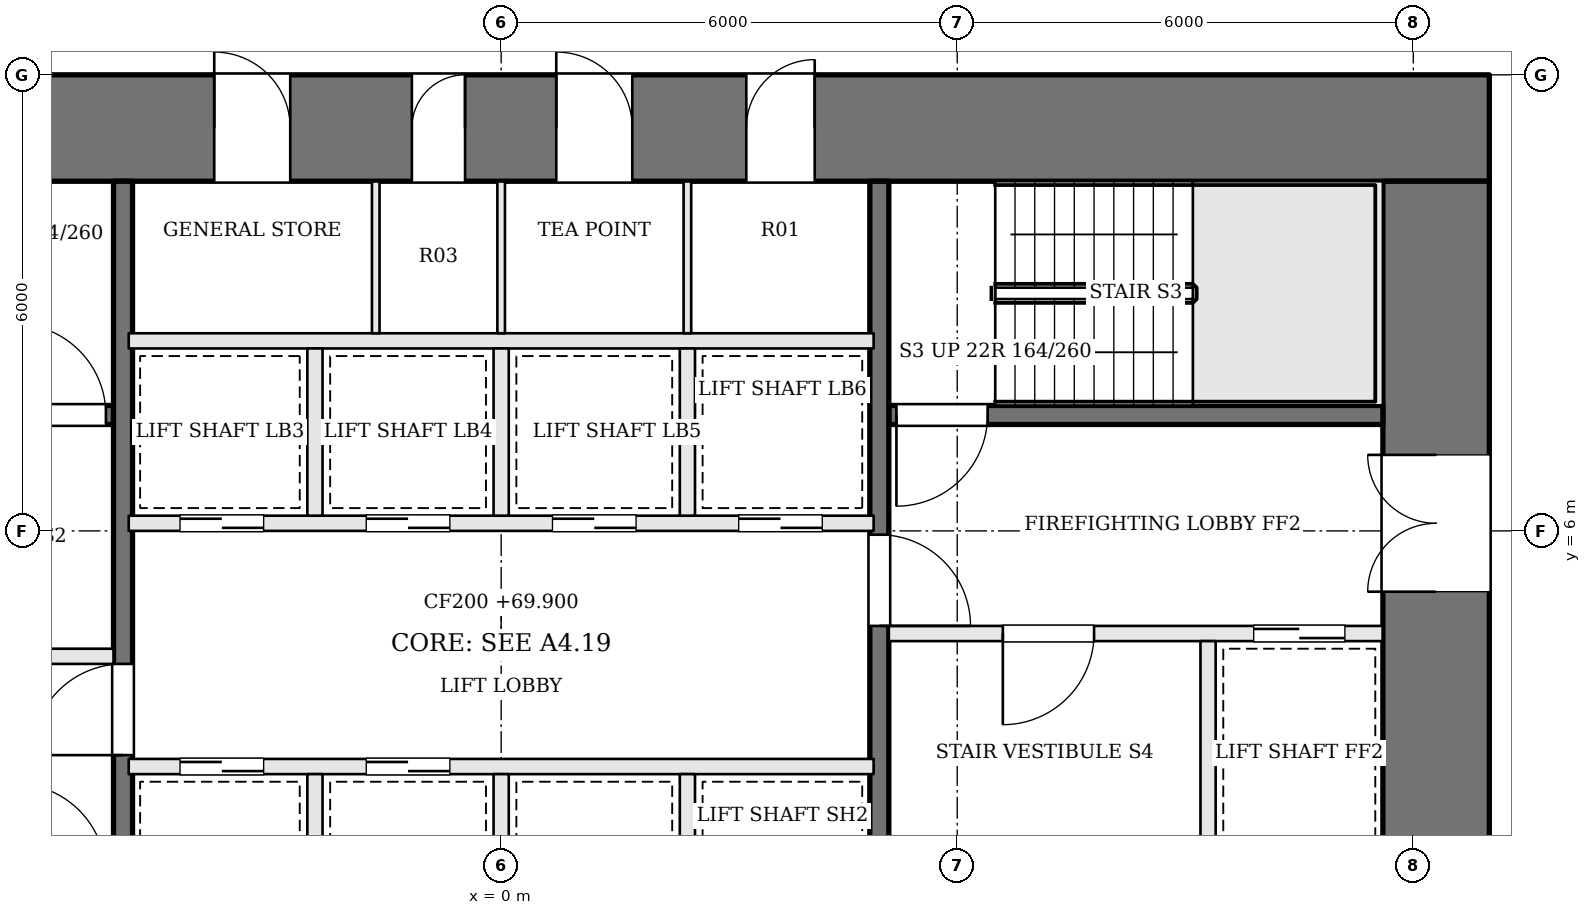
"""IFC4 building model, lengths in metres.
Left out: names, types, materials, properties, quantities, classifications, styles, units other than length and angle.
Written with IfcOpenShell. Run it as: python <this file> out.ifc"""

import sys

from ifc_helpers import new_model, si_unit, direction, frame, frame_2d, origin, place, context, subcontext, project, spatial, rectangle, extrude, element, fill, save


model = new_model("IFC4")
c1 = context("Model", 3, precision=1e-05, world=origin(), true_north=direction((0.0, 1.0)))
c2 = subcontext(c1, "Body", "Model", "MODEL_VIEW")
j1 = project(units=[si_unit("LENGTHUNIT", "METRE"), si_unit("PLANEANGLEUNIT", "RADIAN")], contexts=[c1])
p1 = place(None, origin())
s1 = spatial("IfcSite", under=j1, at=p1, CompositionType="ELEMENT")
p2 = place(p1, origin())
s2 = spatial("IfcBuilding", under=s1, at=p2, CompositionType="ELEMENT")
p3 = place(p2, frame((0.0, 0.0, 69.9)))
s3 = spatial("IfcBuildingStorey", under=s2, at=p3, CompositionType="ELEMENT", Elevation=69.9)
p4 = place(p3, frame((-13.0, 11.3, 0.0), z_axis=(0.0, 0.0, 1.0), x_axis=(1.0, 0.0, 0.0)))
e1 = element("IfcWall", 1, at=p4, inside=s3, PredefinedType="SHEAR", context=c2, shape_type="SweptSolid", body=[
    extrude(rectangle(XDim=26.0, YDim=1.4, at=frame_2d((13.0, 0.0))), origin(), (0.0, 0.0, 1.0), 3.6),
])
p5 = place(p4, frame((9.225, 0.0, 0.0)))
e2 = element("IfcOpeningElement", 2, at=p5, cuts=e1, PredefinedType="OPENING", context=c2, shape_type="SweptSolid", body=[
    extrude(rectangle(XDim=1.0, YDim=2.1, at=frame_2d((0.5, 1.05))), frame((0.0, 0.71, 0.0), z_axis=(0.0, -1.0, 0.0), x_axis=(1.0, 0.0, 0.0)), (0.0, 0.0, 1.0), 1.42),
])
p6 = place(p4, frame((11.825, 0.0, 0.0)))
e3 = element("IfcOpeningElement", 3, at=p6, cuts=e1, PredefinedType="OPENING", context=c2, shape_type="SweptSolid", body=[
    extrude(rectangle(XDim=0.7, YDim=2.1, at=frame_2d((0.35, 1.05))), frame((0.0, 0.71, 0.0), z_axis=(0.0, -1.0, 0.0), x_axis=(1.0, 0.0, 0.0)), (0.0, 0.0, 1.0), 1.42),
])
p7 = place(p4, frame((13.725, 0.0, 0.0)))
e4 = element("IfcOpeningElement", 4, at=p7, cuts=e1, PredefinedType="OPENING", context=c2, shape_type="SweptSolid", body=[
    extrude(rectangle(XDim=1.0, YDim=2.1, at=frame_2d((0.5, 1.05))), frame((0.0, 0.71, 0.0), z_axis=(0.0, -1.0, 0.0), x_axis=(1.0, 0.0, 0.0)), (0.0, 0.0, 1.0), 1.42),
])
p8 = place(p4, frame((16.225, 0.0, 0.0)))
e5 = element("IfcOpeningElement", 5, at=p8, cuts=e1, PredefinedType="OPENING", context=c2, shape_type="SweptSolid", body=[
    extrude(rectangle(XDim=0.9, YDim=2.1, at=frame_2d((0.45, 1.05))), frame((0.0, 0.71, 0.0), z_axis=(0.0, -1.0, 0.0), x_axis=(1.0, 0.0, 0.0)), (0.0, 0.0, 1.0), 1.42),
])
p9 = place(p3, frame((12.3, -1.6, 0.0), z_axis=(0.0, 0.0, 1.0), x_axis=(0.0, 1.0, 0.0)))
e6 = element("IfcWall", 6, at=p9, inside=s3, PredefinedType="SHEAR", context=c2, shape_type="SweptSolid", body=[
    extrude(rectangle(XDim=12.2, YDim=1.4, at=frame_2d((6.1, 0.0))), origin(), (0.0, 0.0, 1.0), 3.6),
])
p10 = place(p9, frame((6.8, 0.0, 0.0)))
e7 = element("IfcOpeningElement", 7, at=p10, cuts=e6, PredefinedType="OPENING", context=c2, shape_type="SweptSolid", body=[
    extrude(rectangle(XDim=1.8, YDim=2.1, at=frame_2d((0.9, 1.05))), frame((0.0, 0.71, 0.0), z_axis=(0.0, -1.0, 0.0), x_axis=(1.0, 0.0, 0.0)), (0.0, 0.0, 1.0), 1.42),
])
p11 = place(p3, frame((11.6, 7.525, 0.0), z_axis=(0.0, 0.0, 1.0), x_axis=(-1.0, 0.0, 0.0)))
e8 = element("IfcWall", 8, at=p11, inside=s3, PredefinedType="SOLIDWALL", context=c2, shape_type="SweptSolid", body=[
    extrude(rectangle(XDim=6.5, YDim=0.25, at=frame_2d((3.25, 0.0))), origin(), (0.0, 0.0, 1.0), 3.4),
])
p12 = place(p11, frame((5.2, 0.0, 0.0)))
e9 = element("IfcOpeningElement", 9, at=p12, cuts=e8, PredefinedType="OPENING", context=c2, shape_type="SweptSolid", body=[
    extrude(rectangle(XDim=1.2, YDim=2.1, at=frame_2d((0.6, 1.05))), frame((0.0, 0.135, 0.0), z_axis=(0.0, -1.0, 0.0), x_axis=(1.0, 0.0, 0.0)), (0.0, 0.0, 1.0), 0.27),
])
p13 = place(p3, frame((-11.6, 4.35, 0.0), z_axis=(0.0, 0.0, 1.0), x_axis=(1.0, 0.0, 0.0)))
e10 = element("IfcWall", 10, at=p13, inside=s3, PredefinedType="SOLIDWALL", context=c2, shape_type="SweptSolid", body=[
    extrude(rectangle(XDim=6.5, YDim=0.2, at=frame_2d((3.25, 0.0))), origin(), (0.0, 0.0, 1.0), 3.4),
])
p14 = place(p13, frame((3.8, 0.0, 0.0)))
e11 = element("IfcOpeningElement", 11, at=p14, cuts=e10, PredefinedType="OPENING", context=c2, shape_type="SweptSolid", body=[
    extrude(rectangle(XDim=1.2, YDim=2.1, at=frame_2d((0.6, 1.05))), frame((0.0, 0.11, 0.0), z_axis=(0.0, -1.0, 0.0), x_axis=(1.0, 0.0, 0.0)), (0.0, 0.0, 1.0), 0.22),
])
p15 = place(p13, frame((0.5, 0.0, 0.0)))
e12 = element("IfcOpeningElement", 12, at=p15, cuts=e10, PredefinedType="OPENING", context=c2, shape_type="SweptSolid", body=[
    extrude(rectangle(XDim=1.2, YDim=2.1, at=frame_2d((0.6, 1.05))), frame((0.0, 0.11, 0.0), z_axis=(0.0, -1.0, 0.0), x_axis=(1.0, 0.0, 0.0)), (0.0, 0.0, 1.0), 0.22),
])
p16 = place(p3, frame((11.6, 4.65, 0.0), z_axis=(0.0, 0.0, 1.0), x_axis=(-1.0, 0.0, 0.0)))
e13 = element("IfcWall", 13, at=p16, inside=s3, PredefinedType="SOLIDWALL", context=c2, shape_type="SweptSolid", body=[
    extrude(rectangle(XDim=6.5, YDim=0.2, at=frame_2d((3.25, 0.0))), origin(), (0.0, 0.0, 1.0), 3.4),
])
p17 = place(p16, frame((3.8, 0.0, 0.0)))
e14 = element("IfcOpeningElement", 14, at=p17, cuts=e13, PredefinedType="OPENING", context=c2, shape_type="SweptSolid", body=[
    extrude(rectangle(XDim=1.2, YDim=2.1, at=frame_2d((0.6, 1.05))), frame((0.0, 0.11, 0.0), z_axis=(0.0, -1.0, 0.0), x_axis=(1.0, 0.0, 0.0)), (0.0, 0.0, 1.0), 0.22),
])
p18 = place(p16, frame((0.5, 0.0, 0.0)))
e15 = element("IfcOpeningElement", 15, at=p18, cuts=e13, PredefinedType="OPENING", context=c2, shape_type="SweptSolid", body=[
    extrude(rectangle(XDim=1.2, YDim=2.1, at=frame_2d((0.6, 1.05))), frame((0.0, 0.11, 0.0), z_axis=(0.0, -1.0, 0.0), x_axis=(1.0, 0.0, 0.0)), (0.0, 0.0, 1.0), 0.22),
])
p19 = place(p3, frame((-11.6, 7.525, 0.0), z_axis=(0.0, 0.0, 1.0), x_axis=(1.0, 0.0, 0.0)))
e16 = element("IfcWall", 16, at=p19, inside=s3, PredefinedType="SOLIDWALL", context=c2, shape_type="SweptSolid", body=[
    extrude(rectangle(XDim=6.5, YDim=0.25, at=frame_2d((3.25, 0.0))), origin(), (0.0, 0.0, 1.0), 3.4),
])
p20 = place(p19, frame((5.2, 0.0, 0.0)))
e17 = element("IfcOpeningElement", 17, at=p20, cuts=e16, PredefinedType="OPENING", context=c2, shape_type="SweptSolid", body=[
    extrude(rectangle(XDim=1.2, YDim=2.1, at=frame_2d((0.6, 1.05))), frame((0.0, 0.135, 0.0), z_axis=(0.0, -1.0, 0.0), x_axis=(1.0, 0.0, 0.0)), (0.0, 0.0, 1.0), 0.27),
])
p21 = place(p3, frame((9.3, 4.55, 0.0), z_axis=(0.0, 0.0, 1.0), x_axis=(0.0, -1.0, 0.0)))
e18 = element("IfcWall", 18, at=p21, inside=s3, PredefinedType="SOLIDWALL", context=c2, shape_type="SweptSolid", body=[
    extrude(rectangle(XDim=3.0, YDim=0.2, at=frame_2d((1.5, 0.0))), origin(), (0.0, 0.0, 1.0), 3.4),
])
p22 = place(p3, frame((-4.975, -1.6, 0.0), z_axis=(0.0, 0.0, 1.0), x_axis=(0.0, 1.0, 0.0)))
e19 = element("IfcWall", 19, at=p22, inside=s3, PredefinedType="SOLIDWALL", context=c2, shape_type="SweptSolid", body=[
    extrude(rectangle(XDim=12.2, YDim=0.25, at=frame_2d((6.1, 0.0))), origin(), (0.0, 0.0, 1.0), 3.4),
])
p23 = place(p22, frame((4.65, 0.0, 0.0)))
e20 = element("IfcOpeningElement", 20, at=p23, cuts=e19, PredefinedType="OPENING", context=c2, shape_type="SweptSolid", body=[
    extrude(rectangle(XDim=1.2, YDim=2.1, at=frame_2d((0.6, 1.05))), frame((0.0, 0.135, 0.0), z_axis=(0.0, -1.0, 0.0), x_axis=(1.0, 0.0, 0.0)), (0.0, 0.0, 1.0), 0.27),
])
p24 = place(p3, frame((4.975, 10.6, 0.0), z_axis=(0.0, 0.0, 1.0), x_axis=(0.0, -1.0, 0.0)))
e21 = element("IfcWall", 21, at=p24, inside=s3, PredefinedType="SOLIDWALL", context=c2, shape_type="SweptSolid", body=[
    extrude(rectangle(XDim=12.2, YDim=0.25, at=frame_2d((6.1, 0.0))), origin(), (0.0, 0.0, 1.0), 3.4),
])
p25 = place(p24, frame((4.65, 0.0, 0.0)))
e22 = element("IfcOpeningElement", 22, at=p25, cuts=e21, PredefinedType="OPENING", context=c2, shape_type="SweptSolid", body=[
    extrude(rectangle(XDim=1.2, YDim=2.1, at=frame_2d((0.6, 1.05))), frame((0.0, 0.135, 0.0), z_axis=(0.0, -1.0, 0.0), x_axis=(1.0, 0.0, 0.0)), (0.0, 0.0, 1.0), 0.27),
])
p26 = place(p3, frame((-4.9, 2.9, 0.0), z_axis=(0.0, 0.0, 1.0), x_axis=(1.0, 0.0, 0.0)))
e23 = element("IfcWall", 23, at=p26, inside=s3, PredefinedType="SOLIDWALL", context=c2, shape_type="SweptSolid", body=[
    extrude(rectangle(XDim=9.8, YDim=0.2, at=frame_2d((4.9, 0.0))), origin(), (0.0, 0.0, 1.0), 3.4),
])
p27 = place(p26, frame((0.675, 0.0, 0.0)))
e24 = element("IfcOpeningElement", 24, at=p27, cuts=e23, PredefinedType="OPENING", context=c2, shape_type="SweptSolid", body=[
    extrude(rectangle(XDim=1.1, YDim=2.1, at=frame_2d((0.55, 1.05))), frame((0.0, 0.11, 0.0), z_axis=(0.0, -1.0, 0.0), x_axis=(1.0, 0.0, 0.0)), (0.0, 0.0, 1.0), 0.22),
])
p28 = place(p26, frame((3.125, 0.0, 0.0)))
e25 = element("IfcOpeningElement", 25, at=p28, cuts=e23, PredefinedType="OPENING", context=c2, shape_type="SweptSolid", body=[
    extrude(rectangle(XDim=1.1, YDim=2.1, at=frame_2d((0.55, 1.05))), frame((0.0, 0.11, 0.0), z_axis=(0.0, -1.0, 0.0), x_axis=(1.0, 0.0, 0.0)), (0.0, 0.0, 1.0), 0.22),
])
p29 = place(p3, frame((-4.9, 6.1, 0.0), z_axis=(0.0, 0.0, 1.0), x_axis=(1.0, 0.0, 0.0)))
e26 = element("IfcWall", 26, at=p29, inside=s3, PredefinedType="SOLIDWALL", context=c2, shape_type="SweptSolid", body=[
    extrude(rectangle(XDim=9.8, YDim=0.2, at=frame_2d((4.9, 0.0))), origin(), (0.0, 0.0, 1.0), 3.4),
])
p30 = place(p29, frame((0.675, 0.0, 0.0)))
e27 = element("IfcOpeningElement", 27, at=p30, cuts=e26, PredefinedType="OPENING", context=c2, shape_type="SweptSolid", body=[
    extrude(rectangle(XDim=1.1, YDim=2.1, at=frame_2d((0.55, 1.05))), frame((0.0, 0.11, 0.0), z_axis=(0.0, -1.0, 0.0), x_axis=(1.0, 0.0, 0.0)), (0.0, 0.0, 1.0), 0.22),
])
p31 = place(p29, frame((3.125, 0.0, 0.0)))
e28 = element("IfcOpeningElement", 28, at=p31, cuts=e26, PredefinedType="OPENING", context=c2, shape_type="SweptSolid", body=[
    extrude(rectangle(XDim=1.1, YDim=2.1, at=frame_2d((0.55, 1.05))), frame((0.0, 0.11, 0.0), z_axis=(0.0, -1.0, 0.0), x_axis=(1.0, 0.0, 0.0)), (0.0, 0.0, 1.0), 0.22),
])
p32 = place(p29, frame((5.575, 0.0, 0.0)))
e29 = element("IfcOpeningElement", 29, at=p32, cuts=e26, PredefinedType="OPENING", context=c2, shape_type="SweptSolid", body=[
    extrude(rectangle(XDim=1.1, YDim=2.1, at=frame_2d((0.55, 1.05))), frame((0.0, 0.11, 0.0), z_axis=(0.0, -1.0, 0.0), x_axis=(1.0, 0.0, 0.0)), (0.0, 0.0, 1.0), 0.22),
])
p33 = place(p29, frame((8.025, 0.0, 0.0)))
e30 = element("IfcOpeningElement", 30, at=p33, cuts=e26, PredefinedType="OPENING", context=c2, shape_type="SweptSolid", body=[
    extrude(rectangle(XDim=1.1, YDim=2.1, at=frame_2d((0.55, 1.05))), frame((0.0, 0.11, 0.0), z_axis=(0.0, -1.0, 0.0), x_axis=(1.0, 0.0, 0.0)), (0.0, 0.0, 1.0), 0.22),
])
p34 = place(p3, frame((-4.9, 8.5, 0.0), z_axis=(0.0, 0.0, 1.0), x_axis=(1.0, 0.0, 0.0)))
e31 = element("IfcWall", 31, at=p34, inside=s3, PredefinedType="SOLIDWALL", context=c2, shape_type="SweptSolid", body=[
    extrude(rectangle(XDim=9.8, YDim=0.2, at=frame_2d((4.9, 0.0))), origin(), (0.0, 0.0, 1.0), 3.4),
])
for number, where, z_axis, x_axis in (
    (32, (-2.45, 0.6, 0.0), (0.0, 0.0, 1.0), (0.0, 1.0, 0.0)),
    (33, (0.0, 0.6, 0.0), (0.0, 0.0, 1.0), (0.0, 1.0, 0.0)),
    (34, (2.45, 0.6, 0.0), (0.0, 0.0, 1.0), (0.0, 1.0, 0.0)),
    (35, (-2.45, 6.2, 0.0), (0.0, 0.0, 1.0), (0.0, 1.0, 0.0)),
    (36, (0.0, 6.2, 0.0), (0.0, 0.0, 1.0), (0.0, 1.0, 0.0)),
    (37, (2.45, 6.2, 0.0), (0.0, 0.0, 1.0), (0.0, 1.0, 0.0)),
):
    element("IfcWall", number, at=place(p3, frame(where, z_axis=z_axis, x_axis=x_axis)), inside=s3, PredefinedType="SOLIDWALL", context=c2, shape_type="SweptSolid", body=[
        extrude(rectangle(XDim=2.2, YDim=0.2, at=frame_2d((1.1, 0.0))), origin(), (0.0, 0.0, 1.0), 3.4),
    ])
for number, where, z_axis, x_axis in (
    (38, (-1.65, 8.6, 0.0), (0.0, 0.0, 1.0), (0.0, 1.0, 0.0)),
    (39, (0.0, 8.6, 0.0), (0.0, 0.0, 1.0), (0.0, 1.0, 0.0)),
    (40, (2.45, 8.6, 0.0), (0.0, 0.0, 1.0), (0.0, 1.0, 0.0)),
):
    element("IfcWall", number, at=place(p3, frame(where, z_axis=z_axis, x_axis=x_axis)), inside=s3, PredefinedType="PARTITIONING", context=c2, shape_type="SweptSolid", body=[
        extrude(rectangle(XDim=2.0, YDim=0.1, at=frame_2d((1.0, 0.0))), origin(), (0.0, 0.0, 1.0), 3.4),
    ])
p35 = place(p10, origin())
e41 = element("IfcDoor", 41, at=p35, inside=s3, OperationType="DOUBLE_DOOR_SINGLE_SWING", PredefinedType="DOOR", context=c2, shape_type="SweptSolid", body=[
    extrude(rectangle(XDim=1.8, YDim=2.1, at=frame_2d((0.9, 1.05))), frame((0.0, 0.025, 0.0), z_axis=(0.0, -1.0, 0.0), x_axis=(1.0, 0.0, 0.0)), (0.0, 0.0, 1.0), 0.05),
])
fill(e7, e41)
p36 = place(p23, origin())
e42 = element("IfcDoor", 42, at=p36, inside=s3, OperationType="SINGLE_SWING_LEFT", PredefinedType="DOOR", context=c2, shape_type="SweptSolid", body=[
    extrude(rectangle(XDim=1.2, YDim=2.1, at=frame_2d((0.6, 1.05))), frame((0.0, 0.025, 0.0), z_axis=(0.0, -1.0, 0.0), x_axis=(1.0, 0.0, 0.0)), (0.0, 0.0, 1.0), 0.05),
])
fill(e20, e42)
p37 = place(p25, origin())
e43 = element("IfcDoor", 43, at=p37, inside=s3, OperationType="SINGLE_SWING_RIGHT", PredefinedType="DOOR", context=c2, shape_type="SweptSolid", body=[
    extrude(rectangle(XDim=1.2, YDim=2.1, at=frame_2d((0.6, 1.05))), frame((0.0, 0.025, 0.0), z_axis=(0.0, -1.0, 0.0), x_axis=(1.0, 0.0, 0.0)), (0.0, 0.0, 1.0), 0.05),
])
fill(e22, e43)
p38 = place(p17, origin())
e44 = element("IfcDoor", 44, at=p38, inside=s3, OperationType="SINGLE_SWING_RIGHT", PredefinedType="DOOR", context=c2, shape_type="SweptSolid", body=[
    extrude(rectangle(XDim=1.2, YDim=2.1, at=frame_2d((0.6, 1.05))), frame((0.0, 0.025, 0.0), z_axis=(0.0, -1.0, 0.0), x_axis=(1.0, 0.0, 0.0)), (0.0, 0.0, 1.0), 0.05),
])
fill(e14, e44)
p39 = place(p12, origin())
e45 = element("IfcDoor", 45, at=p39, inside=s3, OperationType="SINGLE_SWING_RIGHT", PredefinedType="DOOR", context=c2, shape_type="SweptSolid", body=[
    extrude(rectangle(XDim=1.2, YDim=2.1, at=frame_2d((0.6, 1.05))), frame((0.0, 0.025, 0.0), z_axis=(0.0, -1.0, 0.0), x_axis=(1.0, 0.0, 0.0)), (0.0, 0.0, 1.0), 0.05),
])
fill(e9, e45)
p40 = place(p20, origin())
e46 = element("IfcDoor", 46, at=p40, inside=s3, OperationType="SINGLE_SWING_LEFT", PredefinedType="DOOR", context=c2, shape_type="SweptSolid", body=[
    extrude(rectangle(XDim=1.2, YDim=2.1, at=frame_2d((0.6, 1.05))), frame((0.0, 0.025, 0.0), z_axis=(0.0, -1.0, 0.0), x_axis=(1.0, 0.0, 0.0)), (0.0, 0.0, 1.0), 0.05),
])
fill(e17, e46)
p41 = place(p18, origin())
e47 = element("IfcDoor", 47, at=p41, inside=s3, OperationType="SLIDING_TO_RIGHT", PredefinedType="DOOR", context=c2, shape_type="SweptSolid", body=[
    extrude(rectangle(XDim=1.2, YDim=2.1, at=frame_2d((0.6, 1.05))), frame((0.0, 0.025, 0.0), z_axis=(0.0, -1.0, 0.0), x_axis=(1.0, 0.0, 0.0)), (0.0, 0.0, 1.0), 0.05),
])
fill(e15, e47)
p42 = place(p27, origin())
e48 = element("IfcDoor", 48, at=p42, inside=s3, OperationType="SLIDING_TO_RIGHT", PredefinedType="DOOR", context=c2, shape_type="SweptSolid", body=[
    extrude(rectangle(XDim=1.1, YDim=2.1, at=frame_2d((0.55, 1.05))), frame((0.0, 0.025, 0.0), z_axis=(0.0, -1.0, 0.0), x_axis=(1.0, 0.0, 0.0)), (0.0, 0.0, 1.0), 0.05),
])
fill(e24, e48)
p43 = place(p28, origin())
e49 = element("IfcDoor", 49, at=p43, inside=s3, OperationType="SLIDING_TO_LEFT", PredefinedType="DOOR", context=c2, shape_type="SweptSolid", body=[
    extrude(rectangle(XDim=1.1, YDim=2.1, at=frame_2d((0.55, 1.05))), frame((0.0, 0.025, 0.0), z_axis=(0.0, -1.0, 0.0), x_axis=(1.0, 0.0, 0.0)), (0.0, 0.0, 1.0), 0.05),
])
fill(e25, e49)
p44 = place(p30, origin())
e50 = element("IfcDoor", 50, at=p44, inside=s3, OperationType="SLIDING_TO_RIGHT", PredefinedType="DOOR", context=c2, shape_type="SweptSolid", body=[
    extrude(rectangle(XDim=1.1, YDim=2.1, at=frame_2d((0.55, 1.05))), frame((0.0, 0.025, 0.0), z_axis=(0.0, -1.0, 0.0), x_axis=(1.0, 0.0, 0.0)), (0.0, 0.0, 1.0), 0.05),
])
fill(e27, e50)
p45 = place(p31, origin())
e51 = element("IfcDoor", 51, at=p45, inside=s3, OperationType="SLIDING_TO_LEFT", PredefinedType="DOOR", context=c2, shape_type="SweptSolid", body=[
    extrude(rectangle(XDim=1.1, YDim=2.1, at=frame_2d((0.55, 1.05))), frame((0.0, 0.025, 0.0), z_axis=(0.0, -1.0, 0.0), x_axis=(1.0, 0.0, 0.0)), (0.0, 0.0, 1.0), 0.05),
])
fill(e28, e51)
p46 = place(p32, origin())
e52 = element("IfcDoor", 52, at=p46, inside=s3, OperationType="SLIDING_TO_RIGHT", PredefinedType="DOOR", context=c2, shape_type="SweptSolid", body=[
    extrude(rectangle(XDim=1.1, YDim=2.1, at=frame_2d((0.55, 1.05))), frame((0.0, 0.025, 0.0), z_axis=(0.0, -1.0, 0.0), x_axis=(1.0, 0.0, 0.0)), (0.0, 0.0, 1.0), 0.05),
])
fill(e29, e52)
p47 = place(p33, origin())
e53 = element("IfcDoor", 53, at=p47, inside=s3, OperationType="SLIDING_TO_LEFT", PredefinedType="DOOR", context=c2, shape_type="SweptSolid", body=[
    extrude(rectangle(XDim=1.1, YDim=2.1, at=frame_2d((0.55, 1.05))), frame((0.0, 0.025, 0.0), z_axis=(0.0, -1.0, 0.0), x_axis=(1.0, 0.0, 0.0)), (0.0, 0.0, 1.0), 0.05),
])
fill(e30, e53)
p48 = place(p5, origin())
e54 = element("IfcDoor", 54, at=p48, inside=s3, OperationType="SINGLE_SWING_LEFT", PredefinedType="DOOR", context=c2, shape_type="SweptSolid", body=[
    extrude(rectangle(XDim=1.0, YDim=2.1, at=frame_2d((0.5, 1.05))), frame((0.0, 0.025, 0.0), z_axis=(0.0, -1.0, 0.0), x_axis=(1.0, 0.0, 0.0)), (0.0, 0.0, 1.0), 0.05),
])
fill(e2, e54)
p49 = place(p6, origin())
e55 = element("IfcDoor", 55, at=p49, inside=s3, OperationType="SINGLE_SWING_RIGHT", PredefinedType="DOOR", context=c2, shape_type="SweptSolid", body=[
    extrude(rectangle(XDim=0.7, YDim=2.1, at=frame_2d((0.35, 1.05))), frame((0.0, 0.025, 0.0), z_axis=(0.0, -1.0, 0.0), x_axis=(1.0, 0.0, 0.0)), (0.0, 0.0, 1.0), 0.05),
])
fill(e3, e55)
p50 = place(p7, origin())
e56 = element("IfcDoor", 56, at=p50, inside=s3, OperationType="SINGLE_SWING_LEFT", PredefinedType="DOOR", context=c2, shape_type="SweptSolid", body=[
    extrude(rectangle(XDim=1.0, YDim=2.1, at=frame_2d((0.5, 1.05))), frame((0.0, 0.025, 0.0), z_axis=(0.0, -1.0, 0.0), x_axis=(1.0, 0.0, 0.0)), (0.0, 0.0, 1.0), 0.05),
])
fill(e4, e56)
p51 = place(p8, origin())
e57 = element("IfcDoor", 57, at=p51, inside=s3, OperationType="SINGLE_SWING_RIGHT", PredefinedType="DOOR", context=c2, shape_type="SweptSolid", body=[
    extrude(rectangle(XDim=0.9, YDim=2.1, at=frame_2d((0.45, 1.05))), frame((0.0, 0.025, 0.0), z_axis=(0.0, -1.0, 0.0), x_axis=(1.0, 0.0, 0.0)), (0.0, 0.0, 1.0), 0.05),
])
fill(e5, e57)
save(model, sys.argv[1])
